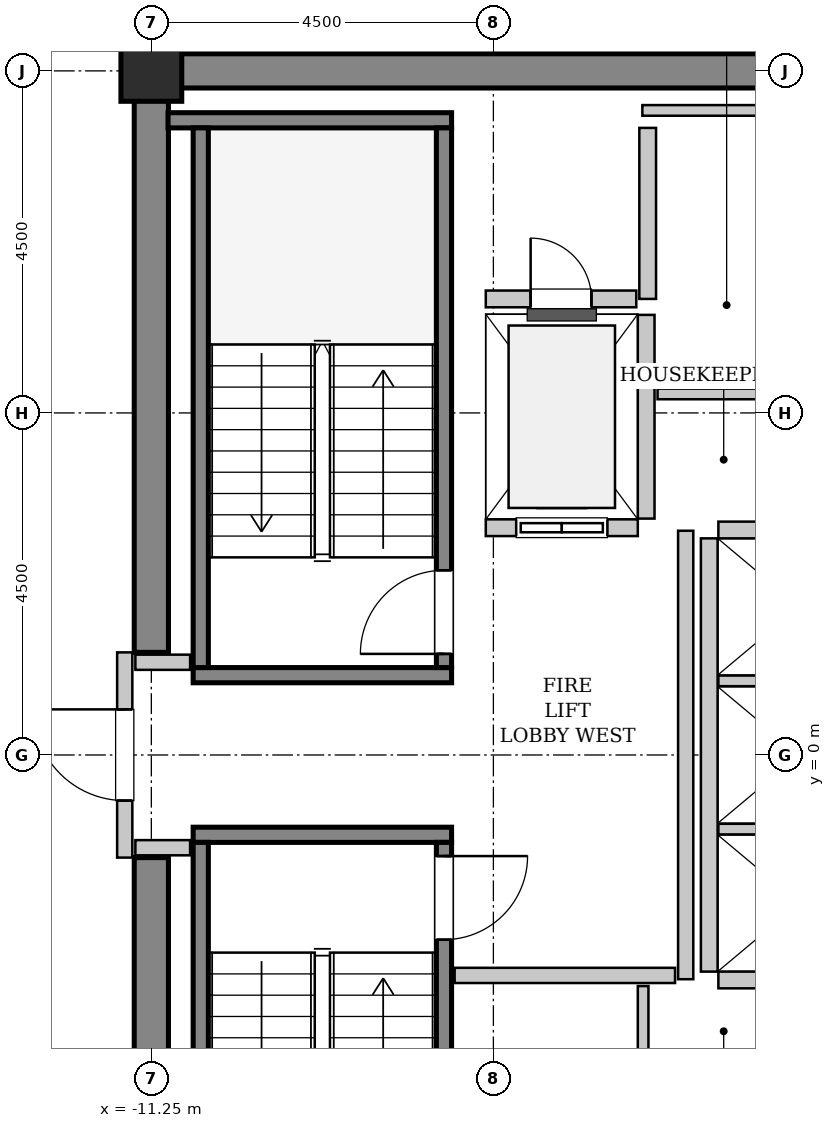
"""IFC4 building model, lengths in metres.
Left out: names, types, materials, properties, quantities, classifications, styles, units other than length and angle.
Written with IfcOpenShell. Run it as: python <this file> out.ifc"""

import sys

from ifc_helpers import new_model, si_unit, direction, frame, frame_2d, origin, origin_2d, place, context, subcontext, project, spatial, rectangle, hollow_rectangle, extrude, source, transform, mapped, element, fill, save


model = new_model("IFC4")
c1 = context("Model", 3, precision=1e-05, world=origin(), true_north=direction((0.0, 1.0)))
c2 = subcontext(c1, "Body", "Model", "MODEL_VIEW")
j1 = project(units=[si_unit("LENGTHUNIT", "METRE"), si_unit("PLANEANGLEUNIT", "RADIAN")], contexts=[c1])
p1 = place(None, origin())
s1 = spatial("IfcSite", under=j1, at=p1, CompositionType="ELEMENT")
p2 = place(p1, origin())
s2 = spatial("IfcBuilding", under=s1, at=p2, CompositionType="ELEMENT")
p3 = place(p2, frame((0.0, 0.0, 237.0)))
s3 = spatial("IfcBuildingStorey", under=s2, at=p3, CompositionType="ELEMENT", Elevation=237.0)
m1 = source(origin(), c2, "Body", "SweptSolid", [
    extrude(rectangle(XDim=9.925, YDim=0.45, at=frame_2d((4.962, 0.0))), origin(), (0.0, 0.0, 1.0), 3.8),
])
p4 = place(p3, frame((-11.475, 9.0, 0.0), z_axis=(0.0, 0.0, 1.0), x_axis=(1.0, 0.0, 0.0)))
e1 = element("IfcWall", 1, at=p4, inside=s3, PredefinedType="SHEAR", context=c2, shape_type="MappedRepresentation", body=[
    mapped(m1, transform((0.0, 0.0, 0.0), x_axis=(1.0, 0.0, 0.0), y_axis=(0.0, 1.0, 0.0), z_axis=(0.0, 0.0, 1.0), scale=1.0)),
])
m2 = source(origin(), c2, "Body", "SweptSolid", [
    extrude(rectangle(XDim=7.425, YDim=0.45, at=frame_2d((3.712, 0.0))), origin(), (0.0, 0.0, 1.0), 3.8),
])
for number, where, z_axis, x_axis in (
    (2, (-11.25, -8.775, 0.0), (0.0, 0.0, 1.0), (0.0, 1.0, 0.0)),
    (3, (-11.25, 1.35, 0.0), (0.0, 0.0, 1.0), (0.0, 1.0, 0.0)),
):
    element("IfcWall", number, at=place(p3, frame(where, z_axis=z_axis, x_axis=x_axis)), inside=s3, PredefinedType="SHEAR", context=c2, shape_type="MappedRepresentation", body=[
        mapped(m2, transform((0.0, 0.0, 0.0), x_axis=(1.0, 0.0, 0.0), y_axis=(0.0, 1.0, 0.0), z_axis=(0.0, 0.0, 1.0), scale=1.0)),
    ])
m3 = source(origin(), c2, "Body", "SweptSolid", [
    extrude(hollow_rectangle(XDim=0.8, YDim=0.8, WallThickness=0.04, InnerFilletRadius=0.04, OuterFilletRadius=0.08, at=origin_2d()), origin(), (0.0, 0.0, 1.0), 3.8),
])
p5 = place(p3, frame((-11.25, 9.0, 0.0), z_axis=(0.0, 0.0, 1.0), x_axis=(1.0, 0.0, 0.0)))
e4 = element("IfcColumn", 4, at=p5, inside=s3, PredefinedType="COLUMN", context=c2, shape_type="MappedRepresentation", body=[
    mapped(m3, transform((0.0, 0.0, 0.0), x_axis=(1.0, 0.0, 0.0), y_axis=(0.0, 1.0, 0.0), z_axis=(0.0, 0.0, 1.0), scale=1.0)),
])
m4 = source(origin(), c2, "Body", "SweptSolid", [
    extrude(rectangle(XDim=3.4, YDim=0.2, at=frame_2d((1.7, 0.0))), origin(), (0.0, 0.0, 1.0), 3.8),
])
p6 = place(p3, frame((-7.3, 1.05, 0.0), z_axis=(0.0, 0.0, 1.0), x_axis=(-1.0, 0.0, 0.0)))
e5 = element("IfcWall", 5, at=p6, inside=s3, PredefinedType="SOLIDWALL", context=c2, shape_type="MappedRepresentation", body=[
    mapped(m4, transform((0.0, 0.0, 0.0), x_axis=(1.0, 0.0, 0.0), y_axis=(0.0, 1.0, 0.0), z_axis=(0.0, 0.0, 1.0), scale=1.0)),
])
m5 = source(origin(), c2, "Body", "SweptSolid", [
    extrude(rectangle(XDim=3.73, YDim=0.2, at=frame_2d((1.865, 0.0))), origin(), (0.0, 0.0, 1.0), 3.8),
])
p7 = place(p3, frame((-7.3, 8.35, 0.0), z_axis=(0.0, 0.0, 1.0), x_axis=(-1.0, 0.0, 0.0)))
e6 = element("IfcWall", 6, at=p7, inside=s3, PredefinedType="SOLIDWALL", context=c2, shape_type="MappedRepresentation", body=[
    mapped(m5, transform((0.0, 0.0, 0.0), x_axis=(1.0, 0.0, 0.0), y_axis=(0.0, 1.0, 0.0), z_axis=(0.0, 0.0, 1.0), scale=1.0)),
])
m6 = source(origin(), c2, "Body", "SweptSolid", [
    extrude(rectangle(XDim=7.1, YDim=0.2, at=frame_2d((3.55, 0.0))), origin(), (0.0, 0.0, 1.0), 3.8),
])
p8 = place(p3, frame((-7.4, 1.15, 0.0), z_axis=(0.0, 0.0, 1.0), x_axis=(0.0, 1.0, 0.0)))
e7 = element("IfcWall", 7, at=p8, inside=s3, PredefinedType="SOLIDWALL", context=c2, shape_type="MappedRepresentation", body=[
    mapped(m6, transform((0.0, 0.0, 0.0), x_axis=(1.0, 0.0, 0.0), y_axis=(0.0, 1.0, 0.0), z_axis=(0.0, 0.0, 1.0), scale=1.0)),
])
p9 = place(p8, frame((0.18, 0.0, 0.0)))
e8 = element("IfcOpeningElement", 8, at=p9, cuts=e7, PredefinedType="OPENING", context=c2, shape_type="SweptSolid", body=[
    extrude(rectangle(XDim=1.1, YDim=2.15, at=frame_2d((0.55, 1.075))), frame((0.0, 0.11, 0.0), z_axis=(0.0, -1.0, 0.0), x_axis=(1.0, 0.0, 0.0)), (0.0, 0.0, 1.0), 0.22),
])
p10 = place(p3, frame((-10.6, 1.15, 0.0), z_axis=(0.0, 0.0, 1.0), x_axis=(0.0, 1.0, 0.0)))
e9 = element("IfcWall", 9, at=p10, inside=s3, PredefinedType="SOLIDWALL", context=c2, shape_type="MappedRepresentation", body=[
    mapped(m6, transform((0.0, 0.0, 0.0), x_axis=(1.0, 0.0, 0.0), y_axis=(0.0, 1.0, 0.0), z_axis=(0.0, 0.0, 1.0), scale=1.0)),
])
p11 = place(p3, frame((-10.7, -1.05, 0.0), z_axis=(0.0, 0.0, 1.0), x_axis=(1.0, 0.0, 0.0)))
e10 = element("IfcWall", 10, at=p11, inside=s3, PredefinedType="SOLIDWALL", context=c2, shape_type="MappedRepresentation", body=[
    mapped(m4, transform((0.0, 0.0, 0.0), x_axis=(1.0, 0.0, 0.0), y_axis=(0.0, 1.0, 0.0), z_axis=(0.0, 0.0, 1.0), scale=1.0)),
])
p12 = place(p3, frame((-10.6, -1.15, 0.0), z_axis=(0.0, 0.0, 1.0), x_axis=(0.0, -1.0, 0.0)))
e11 = element("IfcWall", 11, at=p12, inside=s3, PredefinedType="SOLIDWALL", context=c2, shape_type="MappedRepresentation", body=[
    mapped(m6, transform((0.0, 0.0, 0.0), x_axis=(1.0, 0.0, 0.0), y_axis=(0.0, 1.0, 0.0), z_axis=(0.0, 0.0, 1.0), scale=1.0)),
])
p13 = place(p3, frame((-7.4, -1.15, 0.0), z_axis=(0.0, 0.0, 1.0), x_axis=(0.0, -1.0, 0.0)))
e12 = element("IfcWall", 12, at=p13, inside=s3, PredefinedType="SOLIDWALL", context=c2, shape_type="MappedRepresentation", body=[
    mapped(m6, transform((0.0, 0.0, 0.0), x_axis=(1.0, 0.0, 0.0), y_axis=(0.0, 1.0, 0.0), z_axis=(0.0, 0.0, 1.0), scale=1.0)),
])
p14 = place(p13, frame((0.18, 0.0, 0.0)))
e13 = element("IfcOpeningElement", 13, at=p14, cuts=e12, PredefinedType="OPENING", context=c2, shape_type="SweptSolid", body=[
    extrude(rectangle(XDim=1.1, YDim=2.15, at=frame_2d((0.55, 1.075))), frame((0.0, 0.11, 0.0), z_axis=(0.0, -1.0, 0.0), x_axis=(1.0, 0.0, 0.0)), (0.0, 0.0, 1.0), 0.22),
])
m7 = source(origin(), c2, "Body", "SweptSolid", [
    extrude(rectangle(XDim=2.0, YDim=0.22, at=frame_2d((1.0, 0.0))), origin(), (0.0, 0.0, 1.0), 3.535),
])
p15 = place(p3, frame((-6.85, 2.99, 0.0), z_axis=(0.0, 0.0, 1.0), x_axis=(1.0, 0.0, 0.0)))
e14 = element("IfcWall", 14, at=p15, inside=s3, PredefinedType="SOLIDWALL", context=c2, shape_type="MappedRepresentation", body=[
    mapped(m7, transform((0.0, 0.0, 0.0), x_axis=(1.0, 0.0, 0.0), y_axis=(0.0, 1.0, 0.0), z_axis=(0.0, 0.0, 1.0), scale=1.0)),
])
p16 = place(p15, frame((0.4, 0.0, 0.0)))
e15 = element("IfcOpeningElement", 15, at=p16, cuts=e14, PredefinedType="OPENING", context=c2, shape_type="SweptSolid", body=[
    extrude(rectangle(XDim=1.2, YDim=2.2, at=frame_2d((0.6, 1.1))), frame((0.0, 0.12, 0.0), z_axis=(0.0, -1.0, 0.0), x_axis=(1.0, 0.0, 0.0)), (0.0, 0.0, 1.0), 0.24),
])
m8 = source(origin(), c2, "Body", "SweptSolid", [
    extrude(rectangle(XDim=2.68, YDim=0.22, at=frame_2d((1.34, 0.0))), origin(), (0.0, 0.0, 1.0), 3.535),
])
p17 = place(p3, frame((-4.74, 3.11, 0.0), z_axis=(0.0, 0.0, 1.0), x_axis=(0.0, 1.0, 0.0)))
e16 = element("IfcWall", 16, at=p17, inside=s3, PredefinedType="SOLIDWALL", context=c2, shape_type="MappedRepresentation", body=[
    mapped(m8, transform((0.0, 0.0, 0.0), x_axis=(1.0, 0.0, 0.0), y_axis=(0.0, 1.0, 0.0), z_axis=(0.0, 0.0, 1.0), scale=1.0)),
])
m9 = source(origin(), c2, "Body", "SweptSolid", [
    extrude(rectangle(XDim=5.7, YDim=0.22, at=frame_2d((2.85, 0.0))), origin(), (0.0, 0.0, 1.0), 3.535),
])
p18 = place(p3, frame((-3.91, 2.85, 0.0), z_axis=(0.0, 0.0, 1.0), x_axis=(0.0, -1.0, 0.0)))
e17 = element("IfcWall", 17, at=p18, inside=s3, PredefinedType="SOLIDWALL", context=c2, shape_type="MappedRepresentation", body=[
    mapped(m9, transform((0.0, 0.0, 0.0), x_axis=(1.0, 0.0, 0.0), y_axis=(0.0, 1.0, 0.0), z_axis=(0.0, 0.0, 1.0), scale=1.0)),
])
m10 = source(origin(), c2, "Body", "SweptSolid", [
    extrude(rectangle(XDim=2.13, YDim=0.22, at=frame_2d((1.065, 0.0))), origin(), (0.0, 0.0, 1.0), 3.535),
])
p19 = place(p3, frame((-3.79, -2.96, 0.0), z_axis=(0.0, 0.0, 1.0), x_axis=(1.0, 0.0, 0.0)))
e18 = element("IfcWall", 18, at=p19, inside=s3, PredefinedType="SOLIDWALL", context=c2, shape_type="MappedRepresentation", body=[
    mapped(m10, transform((0.0, 0.0, 0.0), x_axis=(1.0, 0.0, 0.0), y_axis=(0.0, 1.0, 0.0), z_axis=(0.0, 0.0, 1.0), scale=1.0)),
])
m11 = source(origin(), c2, "Body", "SweptSolid", [
    extrude(rectangle(XDim=2.13, YDim=0.14, at=frame_2d((1.065, 0.0))), origin(), (0.0, 0.0, 1.0), 3.535),
])
for number, where, z_axis, x_axis in (
    (19, (-3.79, -0.975, 0.0), (0.0, 0.0, 1.0), (1.0, 0.0, 0.0)),
    (20, (-3.79, 0.975, 0.0), (0.0, 0.0, 1.0), (1.0, 0.0, 0.0)),
):
    element("IfcWall", number, at=place(p3, frame(where, z_axis=z_axis, x_axis=x_axis)), inside=s3, PredefinedType="PARTITIONING", context=c2, shape_type="MappedRepresentation", body=[
        mapped(m11, transform((0.0, 0.0, 0.0), x_axis=(1.0, 0.0, 0.0), y_axis=(0.0, 1.0, 0.0), z_axis=(0.0, 0.0, 1.0), scale=1.0)),
    ])
p20 = place(p3, frame((-1.66, 2.96, 0.0), z_axis=(0.0, 0.0, 1.0), x_axis=(-1.0, 0.0, 0.0)))
e21 = element("IfcWall", 21, at=p20, inside=s3, PredefinedType="SOLIDWALL", context=c2, shape_type="MappedRepresentation", body=[
    mapped(m10, transform((0.0, 0.0, 0.0), x_axis=(1.0, 0.0, 0.0), y_axis=(0.0, 1.0, 0.0), z_axis=(0.0, 0.0, 1.0), scale=1.0)),
])
m12 = source(origin(), c2, "Body", "SweptSolid", [
    extrude(rectangle(XDim=2.25, YDim=0.22, at=frame_2d((1.125, 0.0))), origin(), (0.0, 0.0, 1.0), 3.535),
])
p21 = place(p3, frame((-4.72, 6.0, 0.0), z_axis=(0.0, 0.0, 1.0), x_axis=(0.0, 1.0, 0.0)))
e22 = element("IfcWall", 22, at=p21, inside=s3, PredefinedType="SOLIDWALL", context=c2, shape_type="MappedRepresentation", body=[
    mapped(m12, transform((0.0, 0.0, 0.0), x_axis=(1.0, 0.0, 0.0), y_axis=(0.0, 1.0, 0.0), z_axis=(0.0, 0.0, 1.0), scale=1.0)),
])
m13 = source(origin(), c2, "Body", "SweptSolid", [
    extrude(rectangle(XDim=1.98, YDim=0.22, at=frame_2d((0.99, 0.0))), origin(), (0.0, 0.0, 1.0), 3.535),
])
p22 = place(p3, frame((-6.85, 6.0, 0.0), z_axis=(0.0, 0.0, 1.0), x_axis=(1.0, 0.0, 0.0)))
e23 = element("IfcWall", 23, at=p22, inside=s3, PredefinedType="SOLIDWALL", context=c2, shape_type="MappedRepresentation", body=[
    mapped(m13, transform((0.0, 0.0, 0.0), x_axis=(1.0, 0.0, 0.0), y_axis=(0.0, 1.0, 0.0), z_axis=(0.0, 0.0, 1.0), scale=1.0)),
])
p23 = place(p22, frame((0.59, 0.0, 0.0)))
e24 = element("IfcOpeningElement", 24, at=p23, cuts=e23, PredefinedType="OPENING", context=c2, shape_type="SweptSolid", body=[
    extrude(rectangle(XDim=0.8, YDim=2.0, at=frame_2d((0.4, 1.0))), frame((0.0, 0.12, 0.0), z_axis=(0.0, -1.0, 0.0), x_axis=(1.0, 0.0, 0.0)), (0.0, 0.0, 1.0), 0.24),
])
m14 = source(origin(), c2, "Body", "SweptSolid", [
    extrude(rectangle(XDim=2.7, YDim=0.2, at=frame_2d((1.35, 0.0))), origin(), (0.0, 0.0, 1.0), 2.625),
])
p24 = place(p3, frame((-11.6, -1.35, 0.0), z_axis=(0.0, 0.0, 1.0), x_axis=(0.0, 1.0, 0.0)))
e25 = element("IfcWall", 25, at=p24, inside=s3, PredefinedType="PARTITIONING", context=c2, shape_type="MappedRepresentation", body=[
    mapped(m14, transform((0.0, 0.0, 0.0), x_axis=(1.0, 0.0, 0.0), y_axis=(0.0, 1.0, 0.0), z_axis=(0.0, 0.0, 1.0), scale=1.0)),
])
p25 = place(p24, frame((0.75, 0.0, 0.0)))
e26 = element("IfcOpeningElement", 26, at=p25, cuts=e25, PredefinedType="OPENING", context=c2, shape_type="SweptSolid", body=[
    extrude(rectangle(XDim=1.2, YDim=2.15, at=frame_2d((0.6, 1.075))), frame((0.0, 0.11, 0.0), z_axis=(0.0, -1.0, 0.0), x_axis=(1.0, 0.0, 0.0)), (0.0, 0.0, 1.0), 0.22),
])
m15 = source(origin(), c2, "Body", "SweptSolid", [
    extrude(rectangle(XDim=5.9, YDim=0.2, at=frame_2d((2.95, 0.0))), origin(), (0.0, 0.0, 1.0), 3.535),
])
p26 = place(p3, frame((-4.22, -2.95, 0.0), z_axis=(0.0, 0.0, 1.0), x_axis=(0.0, 1.0, 0.0)))
e27 = element("IfcWall", 27, at=p26, inside=s3, PredefinedType="PARTITIONING", context=c2, shape_type="MappedRepresentation", body=[
    mapped(m15, transform((0.0, 0.0, 0.0), x_axis=(1.0, 0.0, 0.0), y_axis=(0.0, 1.0, 0.0), z_axis=(0.0, 0.0, 1.0), scale=1.0)),
])
m16 = source(origin(), c2, "Body", "SweptSolid", [
    extrude(rectangle(XDim=2.9, YDim=0.2, at=frame_2d((1.45, 0.0))), origin(), (0.0, 0.0, 1.0), 3.535),
])
p27 = place(p3, frame((-7.26, -2.9, 0.0), z_axis=(0.0, 0.0, 1.0), x_axis=(1.0, 0.0, 0.0)))
e28 = element("IfcWall", 28, at=p27, inside=s3, PredefinedType="PARTITIONING", context=c2, shape_type="MappedRepresentation", body=[
    mapped(m16, transform((0.0, 0.0, 0.0), x_axis=(1.0, 0.0, 0.0), y_axis=(0.0, 1.0, 0.0), z_axis=(0.0, 0.0, 1.0), scale=1.0)),
])
m17 = source(origin(), c2, "Body", "SweptSolid", [
    extrude(rectangle(XDim=0.72, YDim=0.2, at=frame_2d((0.36, 0.0))), origin(), (0.0, 0.0, 1.0), 3.535),
])
for number, where, z_axis, x_axis in (
    (29, (-11.46, 1.22, 0.0), (0.0, 0.0, 1.0), (1.0, 0.0, 0.0)),
    (30, (-11.46, -1.22, 0.0), (0.0, 0.0, 1.0), (1.0, 0.0, 0.0)),
):
    element("IfcWall", number, at=place(p3, frame(where, z_axis=z_axis, x_axis=x_axis)), inside=s3, PredefinedType="PARTITIONING", context=c2, shape_type="MappedRepresentation", body=[
        mapped(m17, transform((0.0, 0.0, 0.0), x_axis=(1.0, 0.0, 0.0), y_axis=(0.0, 1.0, 0.0), z_axis=(0.0, 0.0, 1.0), scale=1.0)),
    ])
m18 = source(origin(), c2, "Body", "SweptSolid", [
    extrude(rectangle(XDim=2.95, YDim=0.14, at=frame_2d((1.475, 0.0))), origin(), (0.0, 0.0, 1.0), 3.535),
])
p28 = place(p3, frame((-4.59, 4.75, 0.0), z_axis=(0.0, 0.0, 1.0), x_axis=(1.0, 0.0, 0.0)))
e31 = element("IfcWall", 31, at=p28, inside=s3, PredefinedType="PARTITIONING", context=c2, shape_type="MappedRepresentation", body=[
    mapped(m18, transform((0.0, 0.0, 0.0), x_axis=(1.0, 0.0, 0.0), y_axis=(0.0, 1.0, 0.0), z_axis=(0.0, 0.0, 1.0), scale=1.0)),
])
m19 = source(origin(), c2, "Body", "SweptSolid", [
    extrude(rectangle(XDim=3.15, YDim=0.14, at=frame_2d((1.575, 0.0))), origin(), (0.0, 0.0, 1.0), 3.535),
])
p29 = place(p3, frame((-4.79, 8.48, 0.0), z_axis=(0.0, 0.0, 1.0), x_axis=(1.0, 0.0, 0.0)))
e32 = element("IfcWall", 32, at=p29, inside=s3, PredefinedType="PARTITIONING", context=c2, shape_type="MappedRepresentation", body=[
    mapped(m19, transform((0.0, 0.0, 0.0), x_axis=(1.0, 0.0, 0.0), y_axis=(0.0, 1.0, 0.0), z_axis=(0.0, 0.0, 1.0), scale=1.0)),
])
m20 = source(origin(), c2, "Body", "SweptSolid", [
    extrude(rectangle(XDim=1.1, YDim=0.14, at=frame_2d((0.55, 0.0))), origin(), (0.0, 0.0, 1.0), 3.535),
])
p30 = place(p3, frame((-4.78, -4.14, 0.0), z_axis=(0.0, 0.0, 1.0), x_axis=(0.0, 1.0, 0.0)))
e33 = element("IfcWall", 33, at=p30, inside=s3, PredefinedType="PARTITIONING", context=c2, shape_type="MappedRepresentation", body=[
    mapped(m20, transform((0.0, 0.0, 0.0), x_axis=(1.0, 0.0, 0.0), y_axis=(0.0, 1.0, 0.0), z_axis=(0.0, 0.0, 1.0), scale=1.0)),
])
m21 = source(origin(), c2, "Body", "SweptSolid", [
    extrude(rectangle(XDim=1.1, YDim=2.15, at=frame_2d((0.55, 1.075))), frame((0.0, 0.025, 0.0), z_axis=(0.0, -1.0, 0.0), x_axis=(1.0, 0.0, 0.0)), (0.0, 0.0, 1.0), 0.05),
])
p31 = place(p9, origin())
e34 = element("IfcDoor", 34, at=p31, inside=s3, OperationType="SINGLE_SWING_LEFT", PredefinedType="DOOR", context=c2, shape_type="MappedRepresentation", body=[
    mapped(m21, transform((0.0, 0.0, 0.0), x_axis=(1.0, 0.0, 0.0), y_axis=(0.0, 1.0, 0.0), z_axis=(0.0, 0.0, 1.0), scale=1.0)),
])
fill(e8, e34)
p32 = place(p14, origin())
e35 = element("IfcDoor", 35, at=p32, inside=s3, OperationType="SINGLE_SWING_LEFT", PredefinedType="DOOR", context=c2, shape_type="MappedRepresentation", body=[
    mapped(m21, transform((0.0, 0.0, 0.0), x_axis=(1.0, 0.0, 0.0), y_axis=(0.0, 1.0, 0.0), z_axis=(0.0, 0.0, 1.0), scale=1.0)),
])
fill(e13, e35)
m22 = source(origin(), c2, "Body", "SweptSolid", [
    extrude(rectangle(XDim=1.2, YDim=2.2, at=frame_2d((0.6, 1.1))), frame((0.0, 0.025, 0.0), z_axis=(0.0, -1.0, 0.0), x_axis=(1.0, 0.0, 0.0)), (0.0, 0.0, 1.0), 0.05),
])
p33 = place(p16, origin())
e36 = element("IfcDoor", 36, at=p33, inside=s3, OperationType="SLIDING_TO_LEFT", PredefinedType="DOOR", context=c2, shape_type="MappedRepresentation", body=[
    mapped(m22, transform((0.0, 0.0, 0.0), x_axis=(1.0, 0.0, 0.0), y_axis=(0.0, 1.0, 0.0), z_axis=(0.0, 0.0, 1.0), scale=1.0)),
])
fill(e15, e36)
m23 = source(origin(), c2, "Body", "SweptSolid", [
    extrude(rectangle(XDim=0.8, YDim=2.0, at=frame_2d((0.4, 1.0))), frame((0.0, 0.025, 0.0), z_axis=(0.0, -1.0, 0.0), x_axis=(1.0, 0.0, 0.0)), (0.0, 0.0, 1.0), 0.05),
])
p34 = place(p23, origin())
e37 = element("IfcDoor", 37, at=p34, inside=s3, OperationType="SINGLE_SWING_LEFT", PredefinedType="TRAPDOOR", context=c2, shape_type="MappedRepresentation", body=[
    mapped(m23, transform((0.0, 0.0, 0.0), x_axis=(1.0, 0.0, 0.0), y_axis=(0.0, 1.0, 0.0), z_axis=(0.0, 0.0, 1.0), scale=1.0)),
])
fill(e24, e37)
m24 = source(origin(), c2, "Body", "SweptSolid", [
    extrude(rectangle(XDim=1.2, YDim=2.15, at=frame_2d((0.6, 1.075))), frame((0.0, 0.025, 0.0), z_axis=(0.0, -1.0, 0.0), x_axis=(1.0, 0.0, 0.0)), (0.0, 0.0, 1.0), 0.05),
])
p35 = place(p25, origin())
e38 = element("IfcDoor", 38, at=p35, inside=s3, OperationType="SINGLE_SWING_RIGHT", PredefinedType="DOOR", context=c2, shape_type="MappedRepresentation", body=[
    mapped(m24, transform((0.0, 0.0, 0.0), x_axis=(1.0, 0.0, 0.0), y_axis=(0.0, 1.0, 0.0), z_axis=(0.0, 0.0, 1.0), scale=1.0)),
])
fill(e26, e38)
save(model, sys.argv[1])
